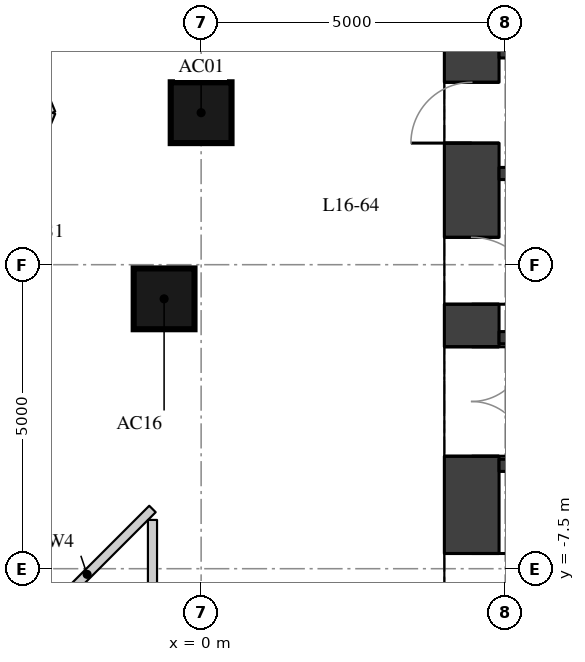
"""IFC4 building model, lengths in metres.
Left out: names, types, materials, properties, quantities, classifications, styles, units other than length and angle.
Written with IfcOpenShell. Run it as: python <this file> out.ifc"""

import sys

from ifc_helpers import new_model, si_unit, direction, frame, frame_2d, origin, origin_2d, place, context, subcontext, project, spatial, rectangle, extrude, element, fill, save


model = new_model("IFC4")
c1 = context("Model", 3, precision=1e-05, world=origin(), true_north=direction((0.0, 1.0)))
c2 = subcontext(c1, "Body", "Model", "MODEL_VIEW")
j1 = project(units=[si_unit("LENGTHUNIT", "METRE"), si_unit("PLANEANGLEUNIT", "RADIAN")], contexts=[c1])
p1 = place(None, origin())
s1 = spatial("IfcSite", under=j1, at=p1, CompositionType="ELEMENT")
p2 = place(p1, origin())
s2 = spatial("IfcBuilding", under=s1, at=p2, CompositionType="ELEMENT")
p3 = place(p2, frame((0.0, 0.0, 61.3)))
s3 = spatial("IfcBuildingStorey", under=s2, at=p3, CompositionType="ELEMENT", Elevation=61.3)
for number, where, z_axis, x_axis in (
    (1, (0.0, 0.0, 0.0), (0.0, 0.0, 1.0), (1.0, 0.0, 0.0)),
    (2, (-0.609, -3.062, 0.0), (0.0, 0.0, 1.0), (1.0, 0.0, 0.0)),
):
    element("IfcColumn", number, at=place(p3, frame(where, z_axis=z_axis, x_axis=x_axis)), inside=s3, PredefinedType="COLUMN", context=c2, shape_type="SweptSolid", body=[
        extrude(rectangle(XDim=1.0, YDim=1.0, at=origin_2d()), origin(), (0.0, 0.0, 1.0), 3.3),
    ])
p4 = place(p3, frame((4.45, -11.1, 0.0), z_axis=(0.0, 0.0, 1.0), x_axis=(0.0, 1.0, 0.0)))
e3 = element("IfcWall", 3, at=p4, inside=s3, PredefinedType="SHEAR", context=c2, shape_type="SweptSolid", body=[
    extrude(rectangle(XDim=22.2, YDim=0.9, at=frame_2d((11.1, 0.0))), origin(), (0.0, 0.0, 1.0), 3.02),
])
p5 = place(p4, frame((2.35, 0.0, 0.0)))
e4 = element("IfcOpeningElement", 4, at=p5, cuts=e3, PredefinedType="OPENING", context=c2, shape_type="SweptSolid", body=[
    extrude(rectangle(XDim=1.5, YDim=2.1, at=frame_2d((0.75, 1.05))), frame((0.0, 0.46, 0.0), z_axis=(0.0, -1.0, 0.0), x_axis=(1.0, 0.0, 0.0)), (0.0, 0.0, 1.0), 0.92),
])
p6 = place(p4, frame((5.45, 0.0, 0.0)))
e5 = element("IfcOpeningElement", 5, at=p6, cuts=e3, PredefinedType="OPENING", context=c2, shape_type="SweptSolid", body=[
    extrude(rectangle(XDim=1.8, YDim=2.1, at=frame_2d((0.9, 1.05))), frame((0.0, 0.46, 0.0), z_axis=(0.0, -1.0, 0.0), x_axis=(1.0, 0.0, 0.0)), (0.0, 0.0, 1.0), 0.92),
])
p7 = place(p4, frame((7.95, 0.0, 0.0)))
e6 = element("IfcOpeningElement", 6, at=p7, cuts=e3, PredefinedType="OPENING", context=c2, shape_type="SweptSolid", body=[
    extrude(rectangle(XDim=1.1, YDim=2.1, at=frame_2d((0.55, 1.05))), frame((0.0, 0.46, 0.0), z_axis=(0.0, -1.0, 0.0), x_axis=(1.0, 0.0, 0.0)), (0.0, 0.0, 1.0), 0.92),
])
p8 = place(p4, frame((10.6, 0.0, 0.0)))
e7 = element("IfcOpeningElement", 7, at=p8, cuts=e3, PredefinedType="OPENING", context=c2, shape_type="SweptSolid", body=[
    extrude(rectangle(XDim=1.0, YDim=2.1, at=frame_2d((0.5, 1.05))), frame((0.0, 0.46, 0.0), z_axis=(0.0, -1.0, 0.0), x_axis=(1.0, 0.0, 0.0)), (0.0, 0.0, 1.0), 0.92),
])
p9 = place(p4, frame((13.15, 0.0, 0.0)))
e8 = element("IfcOpeningElement", 8, at=p9, cuts=e3, PredefinedType="OPENING", context=c2, shape_type="SweptSolid", body=[
    extrude(rectangle(XDim=1.1, YDim=2.1, at=frame_2d((0.55, 1.05))), frame((0.0, 0.46, 0.0), z_axis=(0.0, -1.0, 0.0), x_axis=(1.0, 0.0, 0.0)), (0.0, 0.0, 1.0), 0.92),
])
p10 = place(p4, frame((14.95, 0.0, 0.0)))
e9 = element("IfcOpeningElement", 9, at=p10, cuts=e3, PredefinedType="OPENING", context=c2, shape_type="SweptSolid", body=[
    extrude(rectangle(XDim=1.8, YDim=2.1, at=frame_2d((0.9, 1.05))), frame((0.0, 0.46, 0.0), z_axis=(0.0, -1.0, 0.0), x_axis=(1.0, 0.0, 0.0)), (0.0, 0.0, 1.0), 0.92),
])
p11 = place(p4, frame((18.35, 0.0, 0.0)))
e10 = element("IfcOpeningElement", 10, at=p11, cuts=e3, PredefinedType="OPENING", context=c2, shape_type="SweptSolid", body=[
    extrude(rectangle(XDim=1.5, YDim=2.1, at=frame_2d((0.75, 1.05))), frame((0.0, 0.46, 0.0), z_axis=(0.0, -1.0, 0.0), x_axis=(1.0, 0.0, 0.0)), (0.0, 0.0, 1.0), 0.92),
])
for number, where, z_axis, x_axis in (
    (11, (4.9, 1.0, 0.0), (0.0, 0.0, 1.0), (1.0, 0.0, 0.0)),
    (12, (4.9, -1.0, 0.0), (0.0, 0.0, 1.0), (1.0, 0.0, 0.0)),
):
    element("IfcWall", number, at=place(p3, frame(where, z_axis=z_axis, x_axis=x_axis)), inside=s3, PredefinedType="SHEAR", context=c2, shape_type="SweptSolid", body=[
        extrude(rectangle(XDim=10.2, YDim=0.2, at=frame_2d((5.1, 0.0))), origin(), (0.0, 0.0, 1.0), 3.02),
    ])
p12 = place(p3, frame((4.9, -3.7, 0.0), z_axis=(0.0, 0.0, 1.0), x_axis=(1.0, 0.0, 0.0)))
e13 = element("IfcWall", 13, at=p12, inside=s3, PredefinedType="SHEAR", context=c2, shape_type="SweptSolid", body=[
    extrude(rectangle(XDim=10.2, YDim=0.2, at=frame_2d((5.1, 0.0))), origin(), (0.0, 0.0, 1.0), 3.02),
])
p13 = place(p12, frame((6.3, 0.0, 0.0)))
e14 = element("IfcOpeningElement", 14, at=p13, cuts=e13, PredefinedType="OPENING", context=c2, shape_type="SweptSolid", body=[
    extrude(rectangle(XDim=1.1, YDim=2.1, at=frame_2d((0.55, 1.05))), frame((0.0, 0.11, 0.0), z_axis=(0.0, -1.0, 0.0), x_axis=(1.0, 0.0, 0.0)), (0.0, 0.0, 1.0), 0.22),
])
p14 = place(p12, frame((8.6, 0.0, 0.0)))
e15 = element("IfcOpeningElement", 15, at=p14, cuts=e13, PredefinedType="OPENING", context=c2, shape_type="SweptSolid", body=[
    extrude(rectangle(XDim=1.1, YDim=2.1, at=frame_2d((0.55, 1.05))), frame((0.0, 0.11, 0.0), z_axis=(0.0, -1.0, 0.0), x_axis=(1.0, 0.0, 0.0)), (0.0, 0.0, 1.0), 0.22),
])
p15 = place(p3, frame((4.9, -5.8, 0.0), z_axis=(0.0, 0.0, 1.0), x_axis=(1.0, 0.0, 0.0)))
e16 = element("IfcWall", 16, at=p15, inside=s3, PredefinedType="SHEAR", context=c2, shape_type="SweptSolid", body=[
    extrude(rectangle(XDim=10.2, YDim=0.2, at=frame_2d((5.1, 0.0))), origin(), (0.0, 0.0, 1.0), 3.02),
])
p16 = place(p3, frame((-2.951, -8.668, 0.0), z_axis=(0.0, 0.0, 1.0), x_axis=(0.707106781187, 0.707106781187, 0.0)))
e17 = element("IfcWall", 17, at=p16, inside=s3, PredefinedType="PARTITIONING", context=c2, shape_type="SweptSolid", body=[
    extrude(rectangle(XDim=3.042, YDim=0.15, at=frame_2d((1.521, 0.0))), origin(), (0.0, 0.0, 1.0), 3.02),
])
p17 = place(p3, frame((-0.8, -6.698, 0.0), z_axis=(0.0, 0.0, 1.0), x_axis=(0.0, -1.0, 0.0)))
e18 = element("IfcWall", 18, at=p17, inside=s3, PredefinedType="PARTITIONING", context=c2, shape_type="SweptSolid", body=[
    extrude(rectangle(XDim=2.452, YDim=0.15, at=frame_2d((1.226, 0.0))), origin(), (0.0, 0.0, 1.0), 3.02),
])
for number, where, z_axis, x_axis in (
    (19, (-2.446, 0.0, 0.0), (0.0, 0.0, 1.0), (-0.383, -0.924, 0.0)),
    (20, (-4.073, 3.927, 0.0), (0.0, 0.0, 1.0), (0.383, -0.924, 0.0)),
):
    element("IfcWall", number, at=place(p3, frame(where, z_axis=z_axis, x_axis=x_axis)), inside=s3, PredefinedType="PARTITIONING", context=c2, shape_type="SweptSolid", body=[
        extrude(rectangle(XDim=4.251, YDim=0.1, at=frame_2d((2.125, 0.0))), origin(), (0.0, 0.0, 1.0), 3.02),
    ])
p18 = place(p5, origin())
e21 = element("IfcDoor", 21, at=p18, inside=s3, OperationType="DOUBLE_DOOR_SINGLE_SWING", PredefinedType="DOOR", context=c2, shape_type="SweptSolid", body=[
    extrude(rectangle(XDim=1.5, YDim=2.1, at=frame_2d((0.75, 1.05))), frame((0.0, 0.025, 0.0), z_axis=(0.0, -1.0, 0.0), x_axis=(1.0, 0.0, 0.0)), (0.0, 0.0, 1.0), 0.05),
])
fill(e4, e21)
p19 = place(p6, origin())
e22 = element("IfcDoor", 22, at=p19, inside=s3, OperationType="DOUBLE_DOOR_SINGLE_SWING", PredefinedType="DOOR", context=c2, shape_type="SweptSolid", body=[
    extrude(rectangle(XDim=1.8, YDim=2.1, at=frame_2d((0.9, 1.05))), frame((0.0, 0.025, 0.0), z_axis=(0.0, -1.0, 0.0), x_axis=(1.0, 0.0, 0.0)), (0.0, 0.0, 1.0), 0.05),
])
fill(e5, e22)
p20 = place(p7, origin())
e23 = element("IfcDoor", 23, at=p20, inside=s3, OperationType="SINGLE_SWING_RIGHT", PredefinedType="DOOR", context=c2, shape_type="SweptSolid", body=[
    extrude(rectangle(XDim=1.1, YDim=2.1, at=frame_2d((0.55, 1.05))), frame((0.0, 0.025, 0.0), z_axis=(0.0, -1.0, 0.0), x_axis=(1.0, 0.0, 0.0)), (0.0, 0.0, 1.0), 0.05),
])
fill(e6, e23)
p21 = place(p8, origin())
e24 = element("IfcDoor", 24, at=p21, inside=s3, OperationType="SINGLE_SWING_LEFT", PredefinedType="DOOR", context=c2, shape_type="SweptSolid", body=[
    extrude(rectangle(XDim=1.0, YDim=2.1, at=frame_2d((0.5, 1.05))), frame((0.0, 0.025, 0.0), z_axis=(0.0, -1.0, 0.0), x_axis=(1.0, 0.0, 0.0)), (0.0, 0.0, 1.0), 0.05),
])
fill(e7, e24)
save(model, sys.argv[1])
